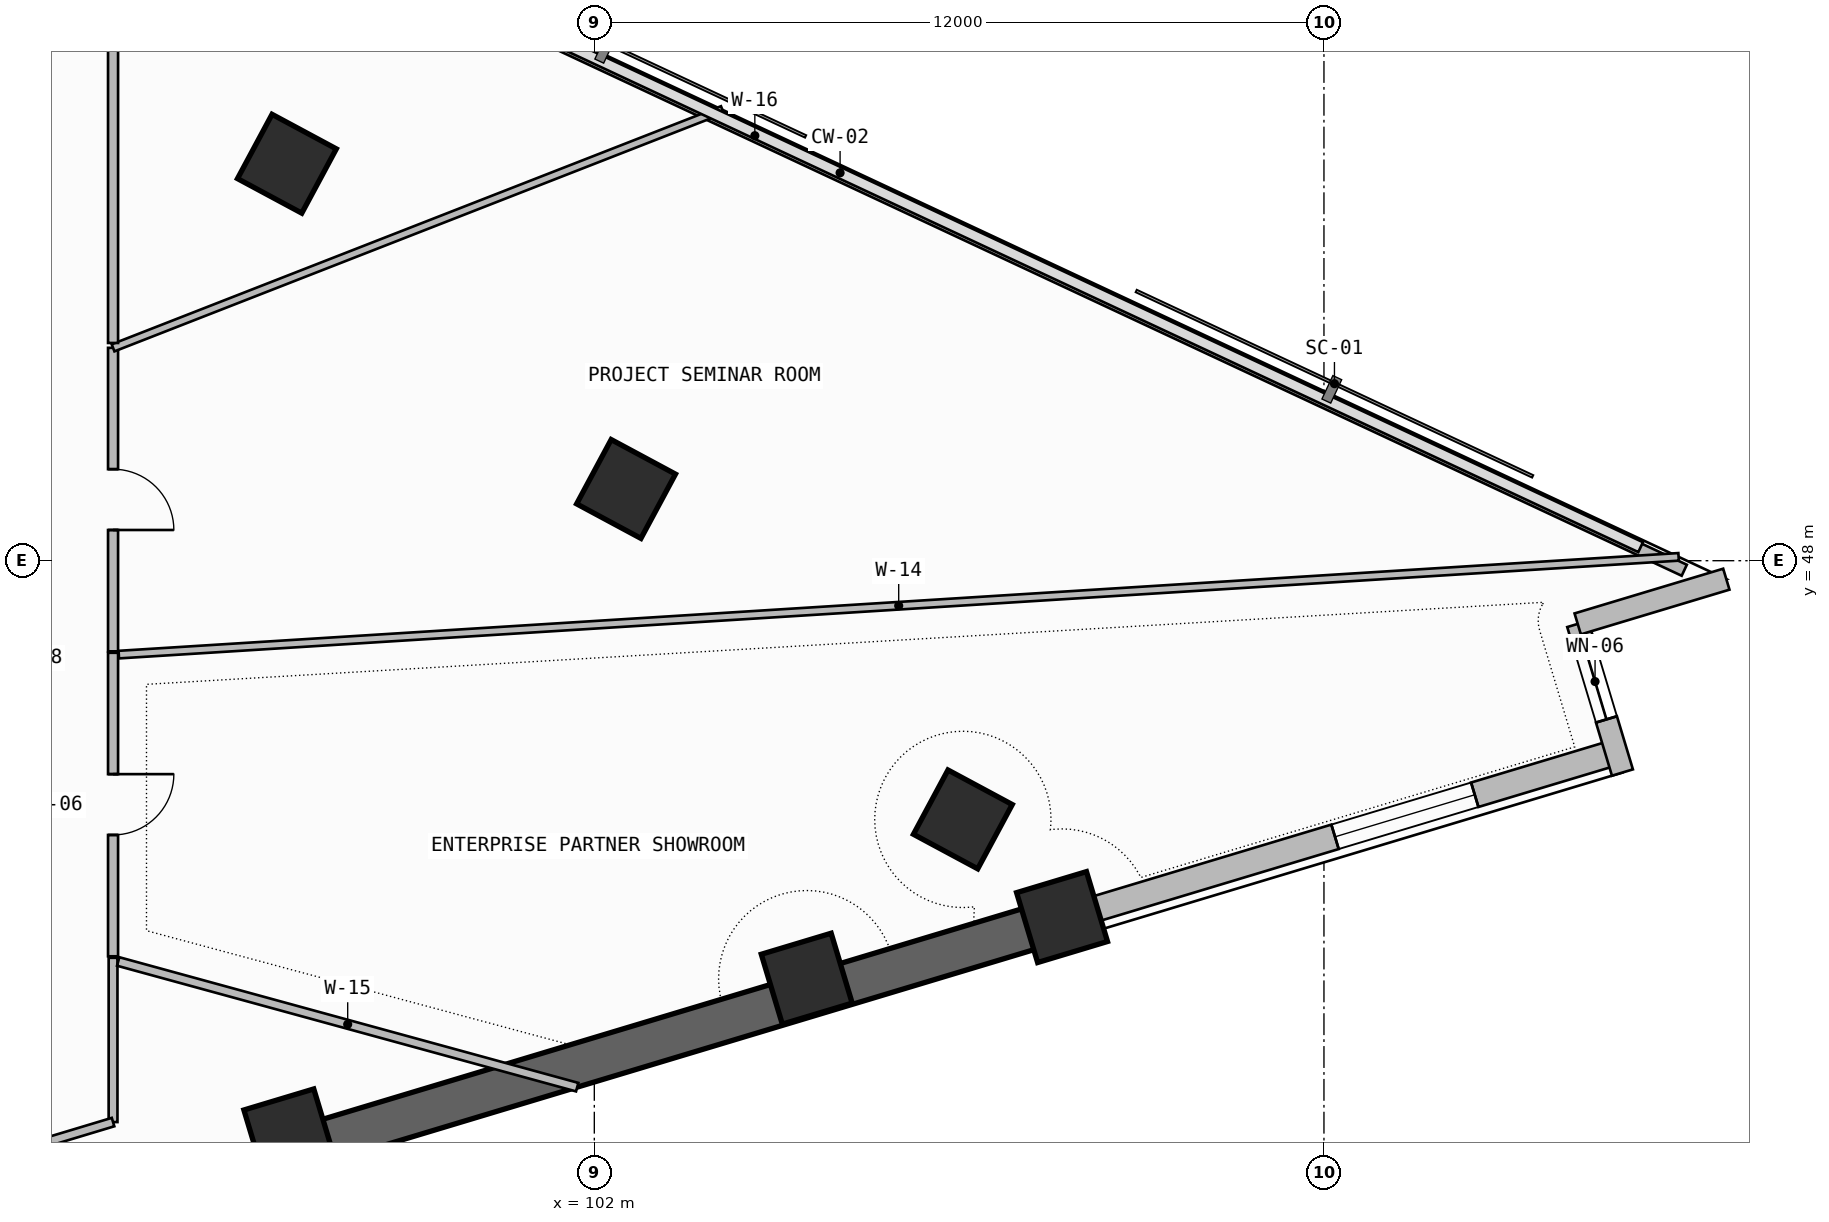
"""IFC4 building model, lengths in metres.
Left out: names, types, materials, properties, quantities, classifications, styles, units other than length and angle.
Written with IfcOpenShell. Run it as: python <this file> out.ifc"""

import sys

from ifc_helpers import new_model, si_unit, direction, frame, frame_2d, origin, origin_2d, place, context, subcontext, project, spatial, rectangle, extrude, element, fill, save


model = new_model("IFC4")
c1 = context("Model", 3, precision=1e-05, world=origin(), true_north=direction((0.0, 1.0)))
c2 = subcontext(c1, "Body", "Model", "MODEL_VIEW")
j1 = project(units=[si_unit("LENGTHUNIT", "METRE"), si_unit("PLANEANGLEUNIT", "RADIAN")], contexts=[c1])
p1 = place(None, origin())
s1 = spatial("IfcSite", under=j1, at=p1, CompositionType="ELEMENT")
p2 = place(p1, origin())
s2 = spatial("IfcBuilding", under=s1, at=p2, CompositionType="ELEMENT")
p3 = place(p2, frame((0.0, 0.0, 139.5)))
s3 = spatial("IfcBuildingStorey", under=s2, at=p3, CompositionType="ELEMENT", Elevation=139.5)
for number, where, z_axis, x_axis in (
    (1, (96.985, 38.565, 0.0), (0.0, 0.0, 1.0), (0.958, 0.288, 0.0)),
    (2, (105.494, 41.126, 0.0), (0.0, 0.0, 1.0), (0.958, 0.288, 0.0)),
    (3, (109.693, 42.139, 0.0), (0.0, 0.0, 1.0), (0.958, 0.288, 0.0)),
    (4, (108.061, 43.746, 0.0), (0.0, 0.0, 1.0), (0.473, 0.881, 0.0)),
    (5, (102.522, 49.179, 0.0), (0.0, 0.0, 1.0), (0.473, 0.881, 0.0)),
    (6, (96.944, 54.528, 0.0), (0.0, 0.0, 1.0), (0.473, 0.881, 0.0)),
):
    element("IfcColumn", number, at=place(p3, frame(where, z_axis=z_axis, x_axis=x_axis)), inside=s3, PredefinedType="COLUMN", context=c2, shape_type="SweptSolid", body=[
        extrude(rectangle(XDim=1.2, YDim=1.2, at=origin_2d()), origin(), (0.0, 0.0, 1.0), 3.6),
    ])
p4 = place(p3, frame((86.1, 35.007, 0.0), z_axis=(0.0, 0.0, 1.0), x_axis=(0.957569401796, 0.288202777129, 0.0)))
e7 = element("IfcWall", 7, at=p4, inside=s3, PredefinedType="SOLIDWALL", context=c2, shape_type="SweptSolid", body=[
    extrude(rectangle(XDim=11.448, YDim=0.42, at=frame_2d((5.724, 0.0))), origin(), (0.0, 0.0, 1.0), 2.325),
])
p5 = place(p4, frame((6.652, 0.0, 1.2)))
e8 = element("IfcOpeningElement", 8, at=p5, cuts=e7, PredefinedType="OPENING", context=c2, shape_type="SweptSolid", body=[
    extrude(rectangle(XDim=2.4, YDim=0.9, at=frame_2d((1.2, 0.45))), frame((0.0, 0.22, 0.0), z_axis=(0.0, -1.0, 0.0), x_axis=(1.0, 0.0, 0.0)), (0.0, 0.0, 1.0), 0.44),
])
p6 = place(p3, frame((97.062, 38.307, -0.26), z_axis=(0.0, 0.0, 1.0), x_axis=(0.957569832102, 0.288201347408, 0.0)))
e9 = element("IfcWall", 9, at=p6, inside=s3, PredefinedType="SHEAR", context=c2, shape_type="SweptSolid", body=[
    extrude(rectangle(XDim=13.199, YDim=0.7, at=frame_2d((6.6, 0.0))), origin(), (0.0, 0.0, 1.0), 3.6),
])
p7 = place(p3, frame((109.701, 42.111, 0.0), z_axis=(0.0, 0.0, 1.0), x_axis=(0.957575807765, 0.288181492091, 0.0)))
e10 = element("IfcWall", 10, at=p7, inside=s3, PredefinedType="SOLIDWALL", context=c2, shape_type="SweptSolid", body=[
    extrude(rectangle(XDim=9.51, YDim=0.42, at=frame_2d((4.755, 0.0))), origin(), (0.0, 0.0, 1.0), 2.325),
])
p8 = place(p7, frame((4.679, 0.0, 1.2)))
e11 = element("IfcOpeningElement", 11, at=p8, cuts=e10, PredefinedType="OPENING", context=c2, shape_type="SweptSolid", body=[
    extrude(rectangle(XDim=2.4, YDim=0.9, at=frame_2d((1.2, 0.45))), frame((0.0, 0.22, 0.0), z_axis=(0.0, -1.0, 0.0), x_axis=(1.0, 0.0, 0.0)), (0.0, 0.0, 1.0), 0.44),
])
p9 = place(p3, frame((118.909, 44.516, 0.0), z_axis=(0.0, 0.0, 1.0), x_axis=(-0.288172590882, 0.95757848653, 0.0)))
e12 = element("IfcWall", 12, at=p9, inside=s3, PredefinedType="SOLIDWALL", context=c2, shape_type="SweptSolid", body=[
    extrude(rectangle(XDim=2.553, YDim=0.36, at=frame_2d((1.276, 0.0))), origin(), (0.0, 0.0, 1.0), 3.34),
])
p10 = place(p9, frame((0.913, 0.0, 0.45)))
e13 = element("IfcOpeningElement", 13, at=p10, cuts=e12, PredefinedType="OPENING", context=c2, shape_type="SweptSolid", body=[
    extrude(rectangle(XDim=1.3, YDim=2.4, at=frame_2d((0.65, 1.2))), frame((0.0, 0.19, 0.0), z_axis=(0.0, -1.0, 0.0), x_axis=(1.0, 0.0, 0.0)), (0.0, 0.0, 1.0), 0.38),
])
p11 = place(p3, frame((118.173, 46.96, 0.0), z_axis=(0.0, 0.0, 1.0), x_axis=(0.95757848653, 0.288172590882, 0.0)))
e14 = element("IfcWall", 14, at=p11, inside=s3, PredefinedType="SOLIDWALL", context=c2, shape_type="SweptSolid", body=[
    extrude(rectangle(XDim=2.553, YDim=0.36, at=frame_2d((1.276, 0.0))), origin(), (0.0, 0.0, 1.0), 3.34),
])
p12 = place(p3, frame((119.926, 47.843, 0.0), z_axis=(0.0, 0.0, 1.0), x_axis=(-0.905880730846, 0.423532881228, 0.0)))
e15 = element("IfcWall", 15, at=p12, inside=s3, PredefinedType="PARAPET", context=c2, shape_type="SweptSolid", body=[
    extrude(rectangle(XDim=33.748, YDim=0.2, at=frame_2d((16.874, 0.0))), origin(), (0.0, 0.0, 1.0), 1.15),
])
p13 = place(p3, frame((94.085, 38.768, 0.0), z_axis=(0.0, 0.0, 1.0), x_axis=(0.0, 1.0, 0.0)))
e16 = element("IfcWall", 16, at=p13, inside=s3, PredefinedType="PARTITIONING", context=c2, shape_type="SweptSolid", body=[
    extrude(rectangle(XDim=2.701, YDim=0.145, at=frame_2d((1.351, 0.0))), origin(), (0.0, 0.0, 1.0), 3.34),
])
p14 = place(p3, frame((92.07, 38.162, 0.0), z_axis=(0.0, 0.0, 1.0), x_axis=(0.957586501491, 0.288145956354, 0.0)))
e17 = element("IfcWall", 17, at=p14, inside=s3, PredefinedType="PARTITIONING", context=c2, shape_type="SweptSolid", body=[
    extrude(rectangle(XDim=2.105, YDim=0.145, at=frame_2d((1.052, 0.0))), origin(), (0.0, 0.0, 1.0), 3.34),
])
p15 = place(p3, frame((94.169, 41.409, 0.0), z_axis=(0.0, 0.0, 1.0), x_axis=(0.964509993059, -0.264046346859, 0.0)))
e18 = element("IfcWall", 18, at=p15, inside=s3, PredefinedType="PARTITIONING", context=c2, shape_type="SweptSolid", body=[
    extrude(rectangle(XDim=7.827, YDim=0.145, at=frame_2d((3.914, 0.0))), origin(), (0.0, 0.0, 1.0), 2.325),
])
p16 = place(p3, frame((94.085, 41.494, 0.0), z_axis=(0.0, 0.0, 1.0), x_axis=(0.0, 1.0, 0.0)))
e19 = element("IfcWall", 19, at=p16, inside=s3, PredefinedType="PARTITIONING", context=c2, shape_type="SweptSolid", body=[
    extrude(rectangle(XDim=4.991, YDim=0.165, at=frame_2d((2.496, 0.0))), origin(), (0.0, 0.0, 1.0), 2.725),
])
p17 = place(p16, frame((1.996, 0.0, 0.0)))
e20 = element("IfcOpeningElement", 20, at=p17, cuts=e19, PredefinedType="OPENING", context=c2, shape_type="SweptSolid", body=[
    extrude(rectangle(XDim=1.0, YDim=2.2, at=frame_2d((0.5, 1.1))), frame((0.0, 0.093, 0.0), z_axis=(0.0, -1.0, 0.0), x_axis=(1.0, 0.0, 0.0)), (0.0, 0.0, 1.0), 0.185),
])
p18 = place(p3, frame((94.179, 46.455, 0.0), z_axis=(0.0, 0.0, 1.0), x_axis=(0.998042031033, 0.062546816791, 0.0)))
e21 = element("IfcWall", 21, at=p18, inside=s3, PredefinedType="PARTITIONING", context=c2, shape_type="SweptSolid", body=[
    extrude(rectangle(XDim=25.703, YDim=0.125, at=frame_2d((12.852, 0.0))), origin(), (0.0, 0.0, 1.0), 2.725),
])
p19 = place(p3, frame((94.085, 46.51, 0.0), z_axis=(0.0, 0.0, 1.0), x_axis=(0.0, 1.0, 0.0)))
e22 = element("IfcWall", 22, at=p19, inside=s3, PredefinedType="PARTITIONING", context=c2, shape_type="SweptSolid", body=[
    extrude(rectangle(XDim=4.991, YDim=0.165, at=frame_2d((2.496, 0.0))), origin(), (0.0, 0.0, 1.0), 2.725),
])
p20 = place(p19, frame((1.996, 0.0, 0.0)))
e23 = element("IfcOpeningElement", 23, at=p20, cuts=e22, PredefinedType="OPENING", context=c2, shape_type="SweptSolid", body=[
    extrude(rectangle(XDim=1.0, YDim=2.2, at=frame_2d((0.5, 1.1))), frame((0.0, 0.093, 0.0), z_axis=(0.0, -1.0, 0.0), x_axis=(1.0, 0.0, 0.0)), (0.0, 0.0, 1.0), 0.185),
])
p21 = place(p3, frame((94.085, 51.5, 0.0), z_axis=(0.0, 0.0, 1.0), x_axis=(0.931423458571, 0.363937275948, 0.0)))
e24 = element("IfcWall", 24, at=p21, inside=s3, PredefinedType="PARTITIONING", context=c2, shape_type="SweptSolid", body=[
    extrude(rectangle(XDim=10.759, YDim=0.125, at=frame_2d((5.379, 0.0))), origin(), (0.0, 0.0, 1.0), 2.725),
])
p22 = place(p3, frame((94.085, 51.581, 0.0), z_axis=(0.0, 0.0, 1.0), x_axis=(0.0, 1.0, 0.0)))
e25 = element("IfcWall", 25, at=p22, inside=s3, PredefinedType="PARTITIONING", context=c2, shape_type="SweptSolid", body=[
    extrude(rectangle(XDim=7.253, YDim=0.165, at=frame_2d((3.626, 0.0))), origin(), (0.0, 0.0, 1.0), 2.725),
])
p23 = place(p8, origin())
e26 = element("IfcWindow", 26, at=p23, inside=s3, PartitioningType="SINGLE_PANEL", PredefinedType="WINDOW", context=c2, shape_type="SweptSolid", body=[
    extrude(rectangle(XDim=2.4, YDim=0.9, at=frame_2d((1.2, 0.45))), frame((0.0, 0.03, 0.0), z_axis=(0.0, -1.0, 0.0), x_axis=(1.0, 0.0, 0.0)), (0.0, 0.0, 1.0), 0.06),
])
fill(e11, e26)
p24 = place(p10, origin())
e27 = element("IfcWindow", 27, at=p24, inside=s3, PartitioningType="SINGLE_PANEL", PredefinedType="WINDOW", context=c2, shape_type="SweptSolid", body=[
    extrude(rectangle(XDim=1.3, YDim=2.4, at=frame_2d((0.65, 1.2))), frame((0.0, 0.03, 0.0), z_axis=(0.0, -1.0, 0.0), x_axis=(1.0, 0.0, 0.0)), (0.0, 0.0, 1.0), 0.06),
])
fill(e13, e27)
p25 = place(p17, frame((1.0, 0.0, 0.0), z_axis=(0.0, 0.0, 1.0), x_axis=(-1.0, 0.0, 0.0)))
e28 = element("IfcDoor", 28, at=p25, inside=s3, OperationType="SINGLE_SWING_LEFT", PredefinedType="DOOR", context=c2, shape_type="SweptSolid", body=[
    extrude(rectangle(XDim=1.0, YDim=2.2, at=frame_2d((0.5, 1.1))), frame((0.0, 0.025, 0.0), z_axis=(0.0, -1.0, 0.0), x_axis=(1.0, 0.0, 0.0)), (0.0, 0.0, 1.0), 0.05),
])
fill(e20, e28)
p26 = place(p20, frame((1.0, 0.0, 0.0), z_axis=(0.0, 0.0, 1.0), x_axis=(-1.0, 0.0, 0.0)))
e29 = element("IfcDoor", 29, at=p26, inside=s3, OperationType="SINGLE_SWING_RIGHT", PredefinedType="DOOR", context=c2, shape_type="SweptSolid", body=[
    extrude(rectangle(XDim=1.0, YDim=2.2, at=frame_2d((0.5, 1.1))), frame((0.0, 0.025, 0.0), z_axis=(0.0, -1.0, 0.0), x_axis=(1.0, 0.0, 0.0)), (0.0, 0.0, 1.0), 0.05),
])
fill(e23, e29)
save(model, sys.argv[1])
